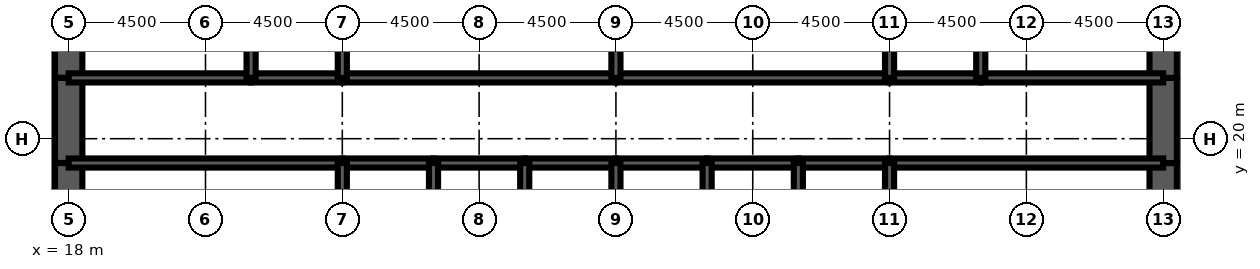
"""IFC4 building model, lengths in metres.
Left out: names, types, materials, properties, quantities, classifications, styles, units other than length and angle.
Written with IfcOpenShell. Run it as: python <this file> out.ifc"""

import sys

from ifc_helpers import new_model, si_unit, direction, frame, frame_2d, origin, place, context, subcontext, project, spatial, rectangle, extrude, element, fill, save


model = new_model("IFC4")
c1 = context("Model", 3, precision=1e-05, world=origin(), true_north=direction((0.0, 1.0)))
c2 = subcontext(c1, "Body", "Model", "MODEL_VIEW")
j1 = project(units=[si_unit("LENGTHUNIT", "METRE"), si_unit("PLANEANGLEUNIT", "RADIAN")], contexts=[c1])
p1 = place(None, origin())
s1 = spatial("IfcSite", under=j1, at=p1, CompositionType="ELEMENT")
p2 = place(p1, origin())
s2 = spatial("IfcBuilding", under=s1, at=p2, CompositionType="ELEMENT")
p3 = place(p2, frame((0.0, 0.0, 45.5)))
s3 = spatial("IfcBuildingStorey", under=s2, at=p3, CompositionType="ELEMENT", Elevation=45.5)
p4 = place(p3, frame((18.0, 26.0, 0.0), z_axis=(0.0, 0.0, 1.0), x_axis=(0.0, -1.0, 0.0)))
e1 = element("IfcWall", 1, at=p4, inside=s3, PredefinedType="SHEAR", context=c2, shape_type="SweptSolid", body=[
    extrude(rectangle(XDim=4.0, YDim=0.9, at=frame_2d((2.0, 0.0))), origin(), (0.0, 0.0, 1.0), 4.5),
])
p5 = place(p3, frame((18.0, 22.0, 0.0), z_axis=(0.0, 0.0, 1.0), x_axis=(0.0, -1.0, 0.0)))
e2 = element("IfcWall", 2, at=p5, inside=s3, PredefinedType="SHEAR", context=c2, shape_type="SweptSolid", body=[
    extrude(rectangle(XDim=2.8, YDim=0.9, at=frame_2d((1.4, 0.0))), origin(), (0.0, 0.0, 1.0), 4.5),
])
p6 = place(p5, frame((0.6, 0.0, 0.0)))
e3 = element("IfcOpeningElement", 3, at=p6, cuts=e2, PredefinedType="OPENING", context=c2, shape_type="SweptSolid", body=[
    extrude(rectangle(XDim=1.8, YDim=2.1, at=frame_2d((0.9, 1.05))), frame((0.0, 0.46, 0.0), z_axis=(0.0, -1.0, 0.0), x_axis=(1.0, 0.0, 0.0)), (0.0, 0.0, 1.0), 0.92),
])
for number, where, z_axis, x_axis in (
    (4, (18.0, 19.2, 0.0), (0.0, 0.0, 1.0), (0.0, -1.0, 0.0)),
    (5, (54.0, 16.0, 0.0), (0.0, 0.0, 1.0), (0.0, 1.0, 0.0)),
):
    element("IfcWall", number, at=place(p3, frame(where, z_axis=z_axis, x_axis=x_axis)), inside=s3, PredefinedType="SHEAR", context=c2, shape_type="SweptSolid", body=[
        extrude(rectangle(XDim=3.2, YDim=0.9, at=frame_2d((1.6, 0.0))), origin(), (0.0, 0.0, 1.0), 4.5),
    ])
p7 = place(p3, frame((54.0, 19.2, 0.0), z_axis=(0.0, 0.0, 1.0), x_axis=(0.0, 1.0, 0.0)))
e6 = element("IfcWall", 6, at=p7, inside=s3, PredefinedType="SHEAR", context=c2, shape_type="SweptSolid", body=[
    extrude(rectangle(XDim=2.8, YDim=0.9, at=frame_2d((1.4, 0.0))), origin(), (0.0, 0.0, 1.0), 4.5),
])
p8 = place(p7, frame((0.4, 0.0, 0.0)))
e7 = element("IfcOpeningElement", 7, at=p8, cuts=e6, PredefinedType="OPENING", context=c2, shape_type="SweptSolid", body=[
    extrude(rectangle(XDim=1.8, YDim=2.1, at=frame_2d((0.9, 1.05))), frame((0.0, 0.46, 0.0), z_axis=(0.0, -1.0, 0.0), x_axis=(1.0, 0.0, 0.0)), (0.0, 0.0, 1.0), 0.92),
])
p9 = place(p3, frame((54.0, 22.0, 0.0), z_axis=(0.0, 0.0, 1.0), x_axis=(0.0, 1.0, 0.0)))
e8 = element("IfcWall", 8, at=p9, inside=s3, PredefinedType="SHEAR", context=c2, shape_type="SweptSolid", body=[
    extrude(rectangle(XDim=4.0, YDim=0.9, at=frame_2d((2.0, 0.0))), origin(), (0.0, 0.0, 1.0), 4.5),
])
p10 = place(p3, frame((18.0, 19.2, 0.0), z_axis=(0.0, 0.0, 1.0), x_axis=(1.0, 0.0, 0.0)))
e9 = element("IfcWall", 9, at=p10, inside=s3, PredefinedType="SOLIDWALL", context=c2, shape_type="SweptSolid", body=[
    extrude(rectangle(XDim=9.0, YDim=0.3, at=frame_2d((4.5, 0.0))), origin(), (0.0, 0.0, 1.0), 4.5),
])
p11 = place(p10, frame((0.65, 0.0, 0.0)))
e10 = element("IfcOpeningElement", 10, at=p11, cuts=e9, PredefinedType="OPENING", context=c2, shape_type="SweptSolid", body=[
    extrude(rectangle(XDim=1.0, YDim=2.1, at=frame_2d((0.5, 1.05))), frame((0.0, 0.16, 0.0), z_axis=(0.0, -1.0, 0.0), x_axis=(1.0, 0.0, 0.0)), (0.0, 0.0, 1.0), 0.32),
])
p12 = place(p3, frame((27.0, 19.2, 0.0), z_axis=(0.0, 0.0, 1.0), x_axis=(1.0, 0.0, 0.0)))
e11 = element("IfcWall", 11, at=p12, inside=s3, PredefinedType="SOLIDWALL", context=c2, shape_type="SweptSolid", body=[
    extrude(rectangle(XDim=3.0, YDim=0.3, at=frame_2d((1.5, 0.0))), origin(), (0.0, 0.0, 1.0), 4.5),
])
p13 = place(p12, frame((0.95, 0.0, 0.0)))
e12 = element("IfcOpeningElement", 12, at=p13, cuts=e11, PredefinedType="OPENING", context=c2, shape_type="SweptSolid", body=[
    extrude(rectangle(XDim=1.1, YDim=2.2, at=frame_2d((0.55, 1.1))), frame((0.0, 0.16, 0.0), z_axis=(0.0, -1.0, 0.0), x_axis=(1.0, 0.0, 0.0)), (0.0, 0.0, 1.0), 0.32),
])
p14 = place(p3, frame((30.0, 19.2, 0.0), z_axis=(0.0, 0.0, 1.0), x_axis=(1.0, 0.0, 0.0)))
e13 = element("IfcWall", 13, at=p14, inside=s3, PredefinedType="SOLIDWALL", context=c2, shape_type="SweptSolid", body=[
    extrude(rectangle(XDim=3.0, YDim=0.3, at=frame_2d((1.5, 0.0))), origin(), (0.0, 0.0, 1.0), 4.5),
])
p15 = place(p14, frame((0.95, 0.0, 0.0)))
e14 = element("IfcOpeningElement", 14, at=p15, cuts=e13, PredefinedType="OPENING", context=c2, shape_type="SweptSolid", body=[
    extrude(rectangle(XDim=1.1, YDim=2.2, at=frame_2d((0.55, 1.1))), frame((0.0, 0.16, 0.0), z_axis=(0.0, -1.0, 0.0), x_axis=(1.0, 0.0, 0.0)), (0.0, 0.0, 1.0), 0.32),
])
p16 = place(p3, frame((33.0, 19.2, 0.0), z_axis=(0.0, 0.0, 1.0), x_axis=(1.0, 0.0, 0.0)))
e15 = element("IfcWall", 15, at=p16, inside=s3, PredefinedType="SOLIDWALL", context=c2, shape_type="SweptSolid", body=[
    extrude(rectangle(XDim=3.0, YDim=0.3, at=frame_2d((1.5, 0.0))), origin(), (0.0, 0.0, 1.0), 4.5),
])
p17 = place(p16, frame((0.95, 0.0, 0.0)))
e16 = element("IfcOpeningElement", 16, at=p17, cuts=e15, PredefinedType="OPENING", context=c2, shape_type="SweptSolid", body=[
    extrude(rectangle(XDim=1.1, YDim=2.2, at=frame_2d((0.55, 1.1))), frame((0.0, 0.16, 0.0), z_axis=(0.0, -1.0, 0.0), x_axis=(1.0, 0.0, 0.0)), (0.0, 0.0, 1.0), 0.32),
])
p18 = place(p3, frame((36.0, 19.2, 0.0), z_axis=(0.0, 0.0, 1.0), x_axis=(1.0, 0.0, 0.0)))
e17 = element("IfcWall", 17, at=p18, inside=s3, PredefinedType="SOLIDWALL", context=c2, shape_type="SweptSolid", body=[
    extrude(rectangle(XDim=3.0, YDim=0.3, at=frame_2d((1.5, 0.0))), origin(), (0.0, 0.0, 1.0), 4.5),
])
p19 = place(p18, frame((0.95, 0.0, 0.0)))
e18 = element("IfcOpeningElement", 18, at=p19, cuts=e17, PredefinedType="OPENING", context=c2, shape_type="SweptSolid", body=[
    extrude(rectangle(XDim=1.1, YDim=2.2, at=frame_2d((0.55, 1.1))), frame((0.0, 0.16, 0.0), z_axis=(0.0, -1.0, 0.0), x_axis=(1.0, 0.0, 0.0)), (0.0, 0.0, 1.0), 0.32),
])
for number, where, z_axis, x_axis in (
    (19, (39.0, 19.2, 0.0), (0.0, 0.0, 1.0), (1.0, 0.0, 0.0)),
    (20, (42.0, 19.2, 0.0), (0.0, 0.0, 1.0), (1.0, 0.0, 0.0)),
):
    element("IfcWall", number, at=place(p3, frame(where, z_axis=z_axis, x_axis=x_axis)), inside=s3, PredefinedType="SOLIDWALL", context=c2, shape_type="SweptSolid", body=[
        extrude(rectangle(XDim=3.0, YDim=0.3, at=frame_2d((1.5, 0.0))), origin(), (0.0, 0.0, 1.0), 4.5),
    ])
p20 = place(p3, frame((45.0, 19.2, 0.0), z_axis=(0.0, 0.0, 1.0), x_axis=(1.0, 0.0, 0.0)))
e21 = element("IfcWall", 21, at=p20, inside=s3, PredefinedType="SOLIDWALL", context=c2, shape_type="SweptSolid", body=[
    extrude(rectangle(XDim=9.0, YDim=0.3, at=frame_2d((4.5, 0.0))), origin(), (0.0, 0.0, 1.0), 4.5),
])
p21 = place(p20, frame((7.35, 0.0, 0.0)))
e22 = element("IfcOpeningElement", 22, at=p21, cuts=e21, PredefinedType="OPENING", context=c2, shape_type="SweptSolid", body=[
    extrude(rectangle(XDim=1.0, YDim=2.1, at=frame_2d((0.5, 1.05))), frame((0.0, 0.16, 0.0), z_axis=(0.0, -1.0, 0.0), x_axis=(1.0, 0.0, 0.0)), (0.0, 0.0, 1.0), 0.32),
])
p22 = place(p3, frame((18.0, 22.0, 0.0), z_axis=(0.0, 0.0, 1.0), x_axis=(1.0, 0.0, 0.0)))
e23 = element("IfcWall", 23, at=p22, inside=s3, PredefinedType="SOLIDWALL", context=c2, shape_type="SweptSolid", body=[
    extrude(rectangle(XDim=6.0, YDim=0.3, at=frame_2d((3.0, 0.0))), origin(), (0.0, 0.0, 1.0), 4.5),
])
p23 = place(p22, frame((4.4, 0.0, 0.0)))
e24 = element("IfcOpeningElement", 24, at=p23, cuts=e23, PredefinedType="OPENING", context=c2, shape_type="SweptSolid", body=[
    extrude(rectangle(XDim=1.0, YDim=2.1, at=frame_2d((0.5, 1.05))), frame((0.0, 0.16, 0.0), z_axis=(0.0, -1.0, 0.0), x_axis=(1.0, 0.0, 0.0)), (0.0, 0.0, 1.0), 0.32),
])
p24 = place(p22, frame((1.0, 0.0, 0.0)))
e25 = element("IfcOpeningElement", 25, at=p24, cuts=e23, PredefinedType="OPENING", context=c2, shape_type="SweptSolid", body=[
    extrude(rectangle(XDim=1.0, YDim=2.1, at=frame_2d((0.5, 1.05))), frame((0.0, 0.16, 0.0), z_axis=(0.0, -1.0, 0.0), x_axis=(1.0, 0.0, 0.0)), (0.0, 0.0, 1.0), 0.32),
])
p25 = place(p3, frame((24.0, 22.0, 0.0), z_axis=(0.0, 0.0, 1.0), x_axis=(1.0, 0.0, 0.0)))
e26 = element("IfcWall", 26, at=p25, inside=s3, PredefinedType="SOLIDWALL", context=c2, shape_type="SweptSolid", body=[
    extrude(rectangle(XDim=3.0, YDim=0.3, at=frame_2d((1.5, 0.0))), origin(), (0.0, 0.0, 1.0), 4.5),
])
p26 = place(p25, frame((1.0, 0.0, 0.0)))
e27 = element("IfcOpeningElement", 27, at=p26, cuts=e26, PredefinedType="OPENING", context=c2, shape_type="SweptSolid", body=[
    extrude(rectangle(XDim=1.0, YDim=2.1, at=frame_2d((0.5, 1.05))), frame((0.0, 0.16, 0.0), z_axis=(0.0, -1.0, 0.0), x_axis=(1.0, 0.0, 0.0)), (0.0, 0.0, 1.0), 0.32),
])
p27 = place(p3, frame((27.0, 22.0, 0.0), z_axis=(0.0, 0.0, 1.0), x_axis=(1.0, 0.0, 0.0)))
e28 = element("IfcWall", 28, at=p27, inside=s3, PredefinedType="SOLIDWALL", context=c2, shape_type="SweptSolid", body=[
    extrude(rectangle(XDim=9.0, YDim=0.3, at=frame_2d((4.5, 0.0))), origin(), (0.0, 0.0, 1.0), 4.5),
])
p28 = place(p27, frame((4.0, 0.0, 0.0)))
e29 = element("IfcOpeningElement", 29, at=p28, cuts=e28, PredefinedType="OPENING", context=c2, shape_type="SweptSolid", body=[
    extrude(rectangle(XDim=1.0, YDim=2.1, at=frame_2d((0.5, 1.05))), frame((0.0, 0.16, 0.0), z_axis=(0.0, -1.0, 0.0), x_axis=(1.0, 0.0, 0.0)), (0.0, 0.0, 1.0), 0.32),
])
p29 = place(p3, frame((36.0, 22.0, 0.0), z_axis=(0.0, 0.0, 1.0), x_axis=(1.0, 0.0, 0.0)))
e30 = element("IfcWall", 30, at=p29, inside=s3, PredefinedType="SOLIDWALL", context=c2, shape_type="SweptSolid", body=[
    extrude(rectangle(XDim=9.0, YDim=0.3, at=frame_2d((4.5, 0.0))), origin(), (0.0, 0.0, 1.0), 4.5),
])
p30 = place(p29, frame((4.0, 0.0, 0.0)))
e31 = element("IfcOpeningElement", 31, at=p30, cuts=e30, PredefinedType="OPENING", context=c2, shape_type="SweptSolid", body=[
    extrude(rectangle(XDim=1.0, YDim=2.1, at=frame_2d((0.5, 1.05))), frame((0.0, 0.16, 0.0), z_axis=(0.0, -1.0, 0.0), x_axis=(1.0, 0.0, 0.0)), (0.0, 0.0, 1.0), 0.32),
])
p31 = place(p3, frame((45.0, 22.0, 0.0), z_axis=(0.0, 0.0, 1.0), x_axis=(1.0, 0.0, 0.0)))
e32 = element("IfcWall", 32, at=p31, inside=s3, PredefinedType="SOLIDWALL", context=c2, shape_type="SweptSolid", body=[
    extrude(rectangle(XDim=3.0, YDim=0.3, at=frame_2d((1.5, 0.0))), origin(), (0.0, 0.0, 1.0), 4.5),
])
p32 = place(p31, frame((1.0, 0.0, 0.0)))
e33 = element("IfcOpeningElement", 33, at=p32, cuts=e32, PredefinedType="OPENING", context=c2, shape_type="SweptSolid", body=[
    extrude(rectangle(XDim=1.0, YDim=2.1, at=frame_2d((0.5, 1.05))), frame((0.0, 0.16, 0.0), z_axis=(0.0, -1.0, 0.0), x_axis=(1.0, 0.0, 0.0)), (0.0, 0.0, 1.0), 0.32),
])
p33 = place(p3, frame((48.0, 22.0, 0.0), z_axis=(0.0, 0.0, 1.0), x_axis=(1.0, 0.0, 0.0)))
e34 = element("IfcWall", 34, at=p33, inside=s3, PredefinedType="SOLIDWALL", context=c2, shape_type="SweptSolid", body=[
    extrude(rectangle(XDim=6.0, YDim=0.3, at=frame_2d((3.0, 0.0))), origin(), (0.0, 0.0, 1.0), 4.5),
])
p34 = place(p33, frame((2.0, 0.0, 0.0)))
e35 = element("IfcOpeningElement", 35, at=p34, cuts=e34, PredefinedType="OPENING", context=c2, shape_type="SweptSolid", body=[
    extrude(rectangle(XDim=1.0, YDim=2.1, at=frame_2d((0.5, 1.05))), frame((0.0, 0.16, 0.0), z_axis=(0.0, -1.0, 0.0), x_axis=(1.0, 0.0, 0.0)), (0.0, 0.0, 1.0), 0.32),
])
p35 = place(p33, frame((4.0, 0.0, 0.0)))
e36 = element("IfcOpeningElement", 36, at=p35, cuts=e34, PredefinedType="OPENING", context=c2, shape_type="SweptSolid", body=[
    extrude(rectangle(XDim=1.0, YDim=2.1, at=frame_2d((0.5, 1.05))), frame((0.0, 0.16, 0.0), z_axis=(0.0, -1.0, 0.0), x_axis=(1.0, 0.0, 0.0)), (0.0, 0.0, 1.0), 0.32),
])
for number, where, z_axis, x_axis in (
    (37, (27.0, 16.0, 0.0), (0.0, 0.0, 1.0), (0.0, 1.0, 0.0)),
    (38, (30.0, 16.0, 0.0), (0.0, 0.0, 1.0), (0.0, 1.0, 0.0)),
    (39, (33.0, 16.0, 0.0), (0.0, 0.0, 1.0), (0.0, 1.0, 0.0)),
    (40, (36.0, 16.0, 0.0), (0.0, 0.0, 1.0), (0.0, 1.0, 0.0)),
    (41, (39.0, 16.0, 0.0), (0.0, 0.0, 1.0), (0.0, 1.0, 0.0)),
    (42, (42.0, 16.0, 0.0), (0.0, 0.0, 1.0), (0.0, 1.0, 0.0)),
    (43, (45.0, 16.0, 0.0), (0.0, 0.0, 1.0), (0.0, 1.0, 0.0)),
):
    element("IfcWall", number, at=place(p3, frame(where, z_axis=z_axis, x_axis=x_axis)), inside=s3, PredefinedType="SOLIDWALL", context=c2, shape_type="SweptSolid", body=[
        extrude(rectangle(XDim=3.2, YDim=0.3, at=frame_2d((1.6, 0.0))), origin(), (0.0, 0.0, 1.0), 4.5),
    ])
for number, where, z_axis, x_axis in (
    (44, (24.0, 22.0, 0.0), (0.0, 0.0, 1.0), (0.0, 1.0, 0.0)),
    (45, (27.0, 22.0, 0.0), (0.0, 0.0, 1.0), (0.0, 1.0, 0.0)),
    (46, (36.0, 22.0, 0.0), (0.0, 0.0, 1.0), (0.0, 1.0, 0.0)),
    (47, (45.0, 22.0, 0.0), (0.0, 0.0, 1.0), (0.0, 1.0, 0.0)),
    (48, (48.0, 22.0, 0.0), (0.0, 0.0, 1.0), (0.0, 1.0, 0.0)),
):
    element("IfcWall", number, at=place(p3, frame(where, z_axis=z_axis, x_axis=x_axis)), inside=s3, PredefinedType="SOLIDWALL", context=c2, shape_type="SweptSolid", body=[
        extrude(rectangle(XDim=4.0, YDim=0.3, at=frame_2d((2.0, 0.0))), origin(), (0.0, 0.0, 1.0), 4.5),
    ])
p36 = place(p3, frame((42.5, 22.15, 0.0), z_axis=(0.0, 0.0, 1.0), x_axis=(0.0, 1.0, 0.0)))
e49 = element("IfcWall", 49, at=p36, inside=s3, PredefinedType="PARTITIONING", context=c2, shape_type="SweptSolid", body=[
    extrude(rectangle(XDim=3.7, YDim=0.15, at=frame_2d((1.85, 0.0))), origin(), (0.0, 0.0, 1.0), 3.0),
])
p37 = place(p36, frame((2.2, 0.0, 0.0)))
e50 = element("IfcOpeningElement", 50, at=p37, cuts=e49, PredefinedType="OPENING", context=c2, shape_type="SweptSolid", body=[
    extrude(rectangle(XDim=1.0, YDim=2.1, at=frame_2d((0.5, 1.05))), frame((0.0, 0.085, 0.0), z_axis=(0.0, -1.0, 0.0), x_axis=(1.0, 0.0, 0.0)), (0.0, 0.0, 1.0), 0.17),
])
for number, where, z_axis, x_axis in (
    (51, (20.625, 22.15, 0.0), (0.0, 0.0, 1.0), (0.0, 1.0, 0.0)),
    (52, (51.375, 22.15, 0.0), (0.0, 0.0, 1.0), (0.0, 1.0, 0.0)),
):
    element("IfcWall", number, at=place(p3, frame(where, z_axis=z_axis, x_axis=x_axis)), inside=s3, PredefinedType="PARTITIONING", context=c2, shape_type="SweptSolid", body=[
        extrude(rectangle(XDim=3.7, YDim=0.15, at=frame_2d((1.85, 0.0))), origin(), (0.0, 0.0, 1.0), 3.0),
    ])
p38 = place(p13, origin())
e53 = element("IfcDoor", 53, at=p38, inside=s3, OperationType="DOUBLE_DOOR_SLIDING", PredefinedType="USERDEFINED", context=c2, shape_type="SweptSolid", body=[
    extrude(rectangle(XDim=1.1, YDim=2.2, at=frame_2d((0.55, 1.1))), frame((0.0, 0.025, 0.0), z_axis=(0.0, -1.0, 0.0), x_axis=(1.0, 0.0, 0.0)), (0.0, 0.0, 1.0), 0.05),
])
fill(e12, e53)
p39 = place(p15, origin())
e54 = element("IfcDoor", 54, at=p39, inside=s3, OperationType="DOUBLE_DOOR_SLIDING", PredefinedType="USERDEFINED", context=c2, shape_type="SweptSolid", body=[
    extrude(rectangle(XDim=1.1, YDim=2.2, at=frame_2d((0.55, 1.1))), frame((0.0, 0.025, 0.0), z_axis=(0.0, -1.0, 0.0), x_axis=(1.0, 0.0, 0.0)), (0.0, 0.0, 1.0), 0.05),
])
fill(e14, e54)
p40 = place(p17, origin())
e55 = element("IfcDoor", 55, at=p40, inside=s3, OperationType="DOUBLE_DOOR_SLIDING", PredefinedType="USERDEFINED", context=c2, shape_type="SweptSolid", body=[
    extrude(rectangle(XDim=1.1, YDim=2.2, at=frame_2d((0.55, 1.1))), frame((0.0, 0.025, 0.0), z_axis=(0.0, -1.0, 0.0), x_axis=(1.0, 0.0, 0.0)), (0.0, 0.0, 1.0), 0.05),
])
fill(e16, e55)
p41 = place(p19, origin())
e56 = element("IfcDoor", 56, at=p41, inside=s3, OperationType="DOUBLE_DOOR_SLIDING", PredefinedType="USERDEFINED", context=c2, shape_type="SweptSolid", body=[
    extrude(rectangle(XDim=1.1, YDim=2.2, at=frame_2d((0.55, 1.1))), frame((0.0, 0.025, 0.0), z_axis=(0.0, -1.0, 0.0), x_axis=(1.0, 0.0, 0.0)), (0.0, 0.0, 1.0), 0.05),
])
fill(e18, e56)
p42 = place(p11, origin())
e57 = element("IfcDoor", 57, at=p42, inside=s3, OperationType="SINGLE_SWING_LEFT", PredefinedType="DOOR", context=c2, shape_type="SweptSolid", body=[
    extrude(rectangle(XDim=1.0, YDim=2.1, at=frame_2d((0.5, 1.05))), frame((0.0, 0.025, 0.0), z_axis=(0.0, -1.0, 0.0), x_axis=(1.0, 0.0, 0.0)), (0.0, 0.0, 1.0), 0.05),
])
fill(e10, e57)
p43 = place(p21, origin())
e58 = element("IfcDoor", 58, at=p43, inside=s3, OperationType="SINGLE_SWING_RIGHT", PredefinedType="DOOR", context=c2, shape_type="SweptSolid", body=[
    extrude(rectangle(XDim=1.0, YDim=2.1, at=frame_2d((0.5, 1.05))), frame((0.0, 0.025, 0.0), z_axis=(0.0, -1.0, 0.0), x_axis=(1.0, 0.0, 0.0)), (0.0, 0.0, 1.0), 0.05),
])
fill(e22, e58)
p44 = place(p6, origin())
e59 = element("IfcDoor", 59, at=p44, inside=s3, OperationType="SINGLE_SWING_LEFT", PredefinedType="DOOR", context=c2, shape_type="SweptSolid", body=[
    extrude(rectangle(XDim=1.8, YDim=2.1, at=frame_2d((0.9, 1.05))), frame((0.0, 0.45, 0.0), z_axis=(0.0, -1.0, 0.0), x_axis=(1.0, 0.0, 0.0)), (0.0, 0.0, 1.0), 0.899),
])
fill(e3, e59)
p45 = place(p8, origin())
e60 = element("IfcDoor", 60, at=p45, inside=s3, OperationType="SINGLE_SWING_LEFT", PredefinedType="DOOR", context=c2, shape_type="SweptSolid", body=[
    extrude(rectangle(XDim=1.8, YDim=2.1, at=frame_2d((0.9, 1.05))), frame((0.0, 0.45, 0.0), z_axis=(0.0, -1.0, 0.0), x_axis=(1.0, 0.0, 0.0)), (0.0, 0.0, 1.0), 0.899),
])
fill(e7, e60)
p46 = place(p23, origin())
e61 = element("IfcDoor", 61, at=p46, inside=s3, OperationType="SINGLE_SWING_RIGHT", PredefinedType="DOOR", context=c2, shape_type="SweptSolid", body=[
    extrude(rectangle(XDim=1.0, YDim=2.1, at=frame_2d((0.5, 1.05))), frame((0.0, 0.025, 0.0), z_axis=(0.0, -1.0, 0.0), x_axis=(1.0, 0.0, 0.0)), (0.0, 0.0, 1.0), 0.05),
])
fill(e24, e61)
p47 = place(p26, origin())
e62 = element("IfcDoor", 62, at=p47, inside=s3, OperationType="SINGLE_SWING_LEFT", PredefinedType="DOOR", context=c2, shape_type="SweptSolid", body=[
    extrude(rectangle(XDim=1.0, YDim=2.1, at=frame_2d((0.5, 1.05))), frame((0.0, 0.025, 0.0), z_axis=(0.0, -1.0, 0.0), x_axis=(1.0, 0.0, 0.0)), (0.0, 0.0, 1.0), 0.05),
])
fill(e27, e62)
p48 = place(p28, origin())
e63 = element("IfcDoor", 63, at=p48, inside=s3, OperationType="SINGLE_SWING_LEFT", PredefinedType="DOOR", context=c2, shape_type="SweptSolid", body=[
    extrude(rectangle(XDim=1.0, YDim=2.1, at=frame_2d((0.5, 1.05))), frame((0.0, 0.025, 0.0), z_axis=(0.0, -1.0, 0.0), x_axis=(1.0, 0.0, 0.0)), (0.0, 0.0, 1.0), 0.05),
])
fill(e29, e63)
p49 = place(p30, origin())
e64 = element("IfcDoor", 64, at=p49, inside=s3, OperationType="SINGLE_SWING_LEFT", PredefinedType="DOOR", context=c2, shape_type="SweptSolid", body=[
    extrude(rectangle(XDim=1.0, YDim=2.1, at=frame_2d((0.5, 1.05))), frame((0.0, 0.025, 0.0), z_axis=(0.0, -1.0, 0.0), x_axis=(1.0, 0.0, 0.0)), (0.0, 0.0, 1.0), 0.05),
])
fill(e31, e64)
p50 = place(p32, origin())
e65 = element("IfcDoor", 65, at=p50, inside=s3, OperationType="SINGLE_SWING_LEFT", PredefinedType="DOOR", context=c2, shape_type="SweptSolid", body=[
    extrude(rectangle(XDim=1.0, YDim=2.1, at=frame_2d((0.5, 1.05))), frame((0.0, 0.025, 0.0), z_axis=(0.0, -1.0, 0.0), x_axis=(1.0, 0.0, 0.0)), (0.0, 0.0, 1.0), 0.05),
])
fill(e33, e65)
p51 = place(p34, origin())
e66 = element("IfcDoor", 66, at=p51, inside=s3, OperationType="SINGLE_SWING_LEFT", PredefinedType="DOOR", context=c2, shape_type="SweptSolid", body=[
    extrude(rectangle(XDim=1.0, YDim=2.1, at=frame_2d((0.5, 1.05))), frame((0.0, 0.025, 0.0), z_axis=(0.0, -1.0, 0.0), x_axis=(1.0, 0.0, 0.0)), (0.0, 0.0, 1.0), 0.05),
])
fill(e35, e66)
p52 = place(p24, origin())
e67 = element("IfcDoor", 67, at=p52, inside=s3, OperationType="SINGLE_SWING_LEFT", PredefinedType="DOOR", context=c2, shape_type="SweptSolid", body=[
    extrude(rectangle(XDim=1.0, YDim=2.1, at=frame_2d((0.5, 1.05))), frame((0.0, 0.025, 0.0), z_axis=(0.0, -1.0, 0.0), x_axis=(1.0, 0.0, 0.0)), (0.0, 0.0, 1.0), 0.05),
])
fill(e25, e67)
p53 = place(p35, origin())
e68 = element("IfcDoor", 68, at=p53, inside=s3, OperationType="SINGLE_SWING_RIGHT", PredefinedType="DOOR", context=c2, shape_type="SweptSolid", body=[
    extrude(rectangle(XDim=1.0, YDim=2.1, at=frame_2d((0.5, 1.05))), frame((0.0, 0.025, 0.0), z_axis=(0.0, -1.0, 0.0), x_axis=(1.0, 0.0, 0.0)), (0.0, 0.0, 1.0), 0.05),
])
fill(e36, e68)
save(model, sys.argv[1])
